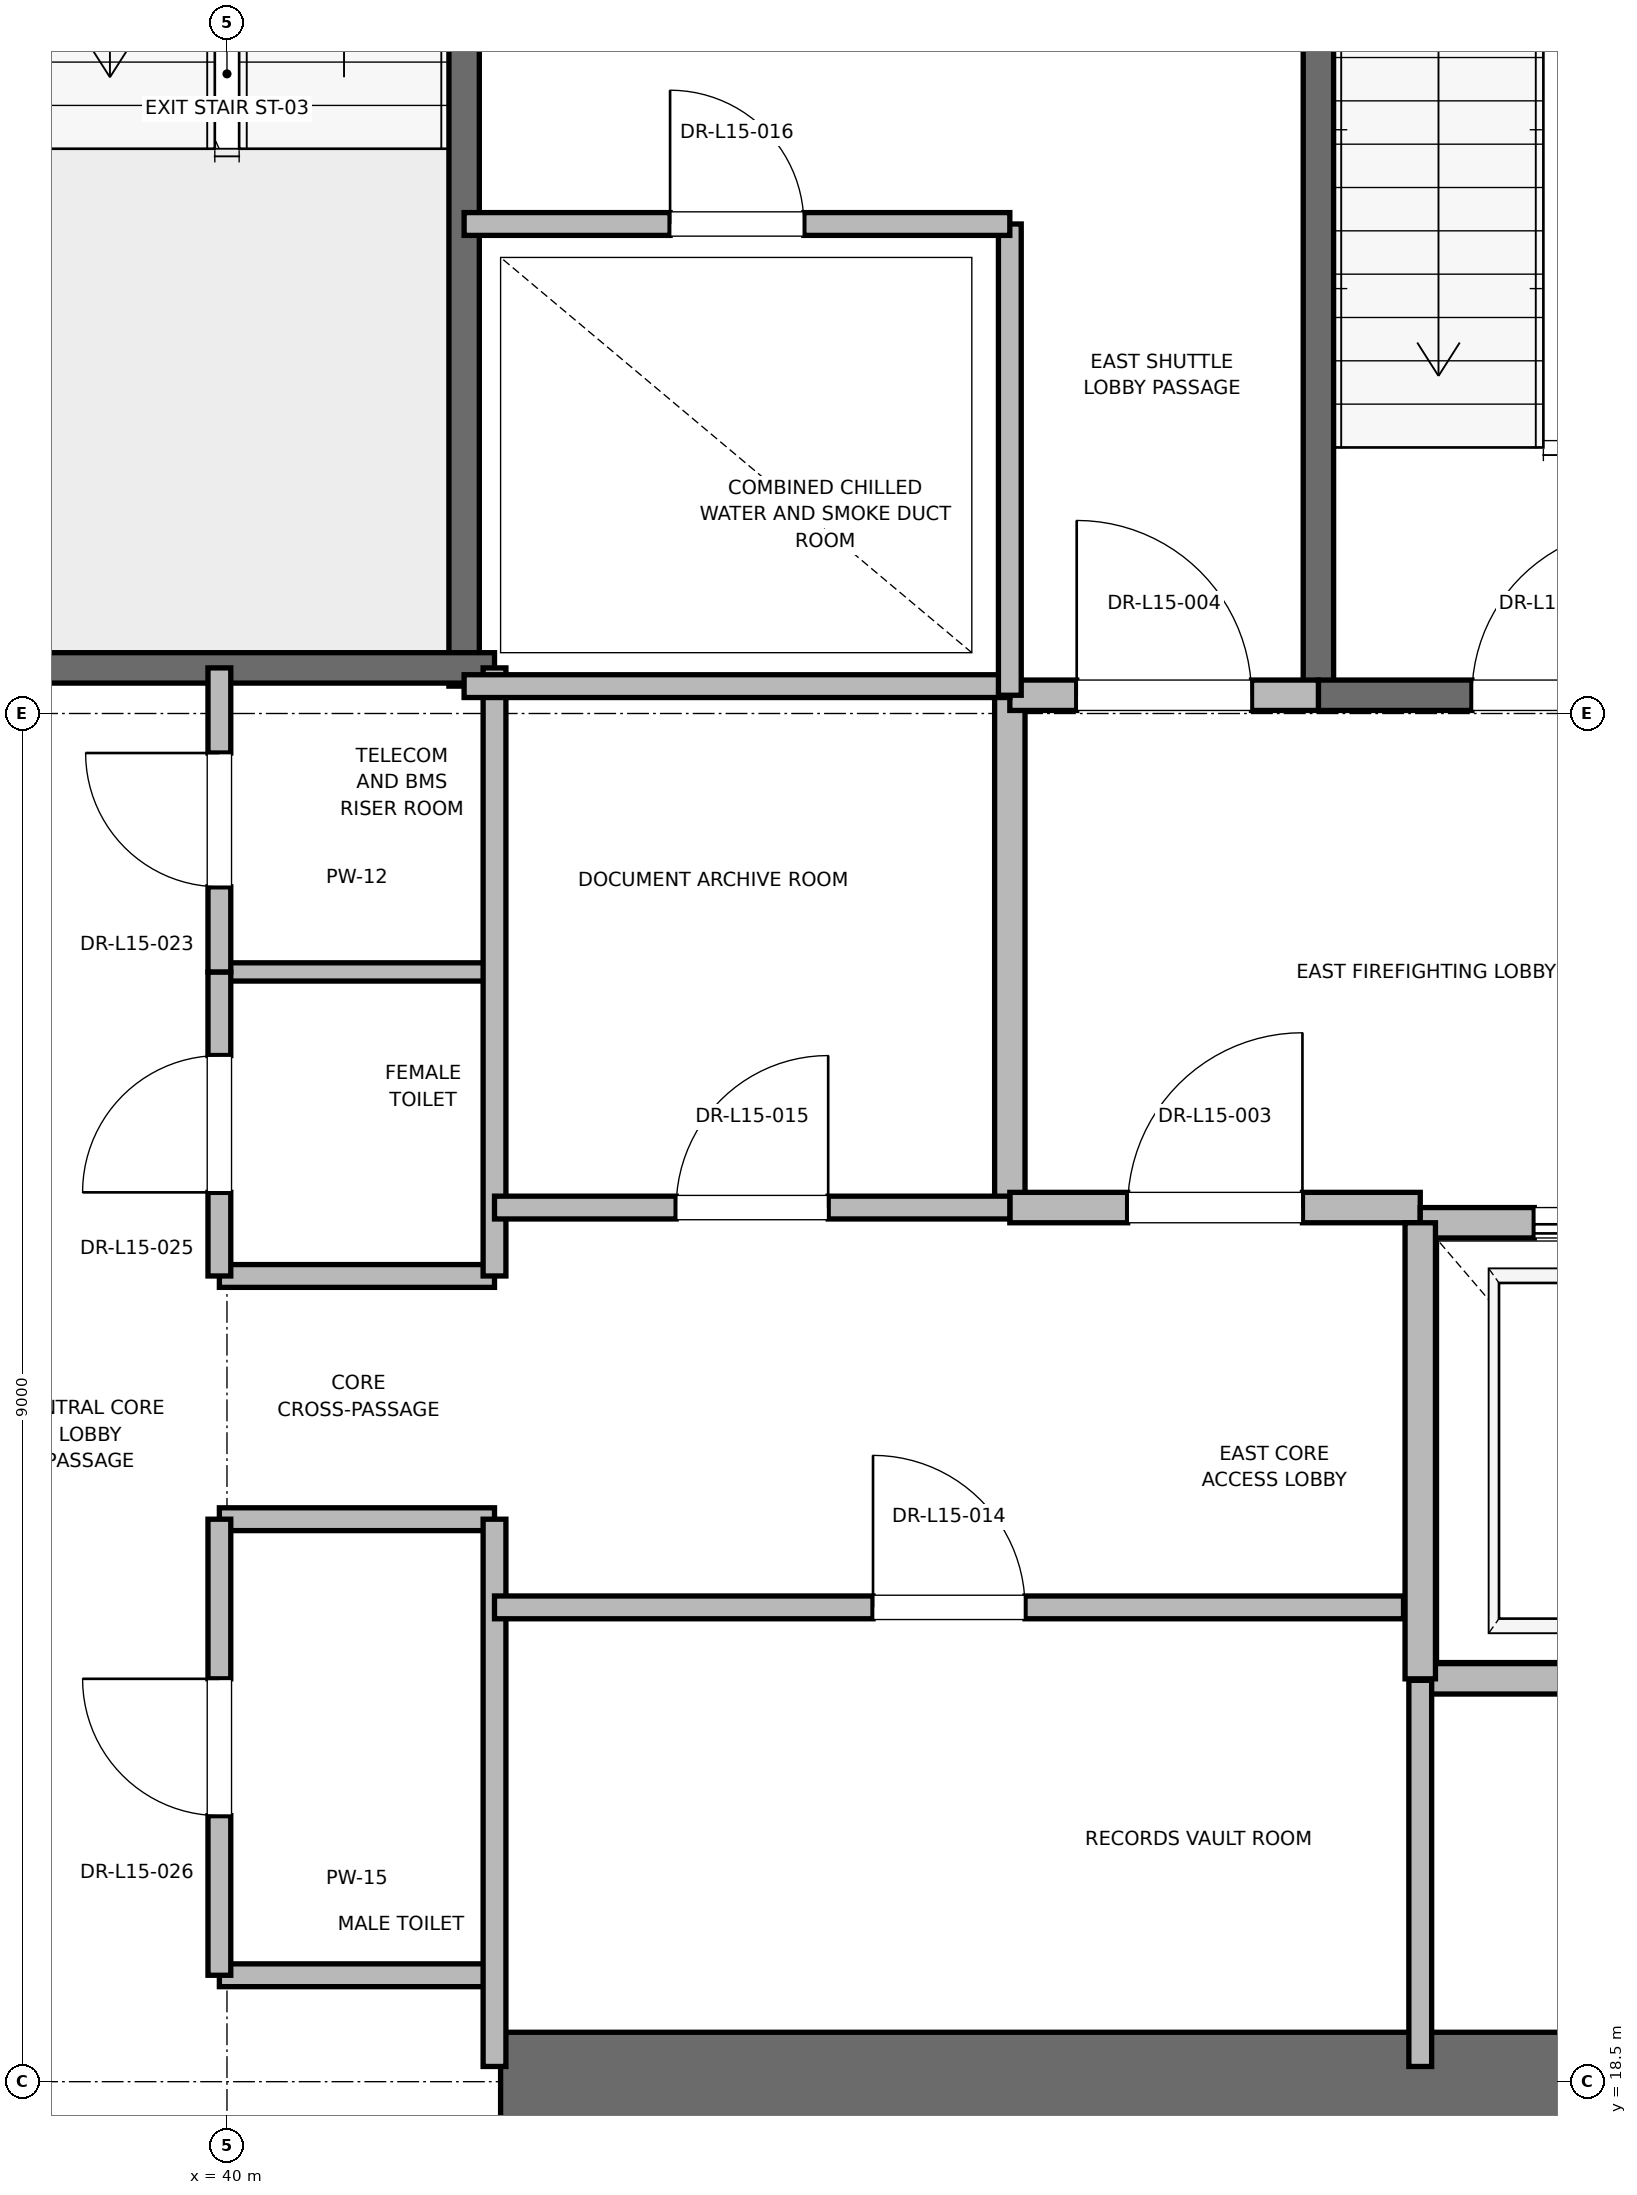
"""IFC4 building model, lengths in metres.
Left out: names, types, materials, properties, quantities, classifications, styles, units other than length and angle.
Written with IfcOpenShell. Run it as: python <this file> out.ifc"""

import sys

from ifc_helpers import new_model, si_unit, direction, frame, frame_2d, origin, place, context, subcontext, project, spatial, rectangle, extrude, element, fill, save


model = new_model("IFC4")
c1 = context("Model", 3, precision=1e-05, world=origin(), true_north=direction((0.0, 1.0)))
c2 = subcontext(c1, "Body", "Model", "MODEL_VIEW")
j1 = project(units=[si_unit("LENGTHUNIT", "METRE"), si_unit("PLANEANGLEUNIT", "RADIAN")], contexts=[c1])
p1 = place(None, origin())
s1 = spatial("IfcSite", under=j1, at=p1, CompositionType="ELEMENT")
p2 = place(p1, origin())
s2 = spatial("IfcBuilding", under=s1, at=p2, CompositionType="ELEMENT")
p3 = place(p2, frame((0.0, 0.0, 67.6)))
s3 = spatial("IfcBuildingStorey", under=s2, at=p3, CompositionType="ELEMENT", Elevation=67.6)
p4 = place(p3, frame((41.8, 18.5, 0.0), z_axis=(0.0, 0.0, 1.0), x_axis=(1.0, 0.0, 0.0)))
e1 = element("IfcWall", 1, at=p4, inside=s3, PredefinedType="SHEAR", context=c2, shape_type="SweptSolid", body=[
    extrude(rectangle(XDim=9.2, YDim=0.65, at=frame_2d((4.6, 0.0))), origin(), (0.0, 0.0, 1.0), 3.76),
])
p5 = place(p3, frame((47.18, 27.62, 0.0), z_axis=(0.0, 0.0, 1.0), x_axis=(0.0, 1.0, 0.0)))
e2 = element("IfcWall", 2, at=p5, inside=s3, PredefinedType="SOLIDWALL", context=c2, shape_type="SweptSolid", body=[
    extrude(rectangle(XDim=8.18, YDim=0.2, at=frame_2d((4.09, 0.0))), origin(), (0.0, 0.0, 1.0), 3.76),
])
p6 = place(p3, frame((47.18, 27.62, 0.0), z_axis=(0.0, 0.0, 1.0), x_axis=(1.0, 0.0, 0.0)))
e3 = element("IfcWall", 3, at=p6, inside=s3, PredefinedType="SOLIDWALL", context=c2, shape_type="SweptSolid", body=[
    extrude(rectangle(XDim=3.12, YDim=0.2, at=frame_2d((1.56, 0.0))), origin(), (0.0, 0.0, 1.0), 3.76),
])
p7 = place(p6, frame((1.01, 0.0, 0.0)))
e4 = element("IfcOpeningElement", 4, at=p7, cuts=e3, PredefinedType="OPENING", context=c2, shape_type="SweptSolid", body=[
    extrude(rectangle(XDim=1.1, YDim=2.15, at=frame_2d((0.55, 1.075))), frame((0.0, 0.1, 0.0), z_axis=(0.0, -1.0, 0.0), x_axis=(1.0, 0.0, 0.0)), (0.0, 0.0, 1.0), 0.2),
])
p8 = place(p3, frame((41.56, 27.68, 0.0), z_axis=(0.0, 0.0, 1.0), x_axis=(0.0, 1.0, 0.0)))
e5 = element("IfcWall", 5, at=p8, inside=s3, PredefinedType="SOLIDWALL", context=c2, shape_type="SweptSolid", body=[
    extrude(rectangle(XDim=8.57, YDim=0.2, at=frame_2d((4.285, 0.0))), origin(), (0.0, 0.0, 1.0), 3.76),
])
p9 = place(p3, frame((38.44, 27.8, 0.0), z_axis=(0.0, 0.0, 1.0), x_axis=(1.0, 0.0, 0.0)))
e6 = element("IfcWall", 6, at=p9, inside=s3, PredefinedType="SOLIDWALL", context=c2, shape_type="SweptSolid", body=[
    extrude(rectangle(XDim=3.32, YDim=0.2, at=frame_2d((1.66, 0.0))), origin(), (0.0, 0.0, 1.0), 3.76),
])
p10 = place(p3, frame((45.15, 24.25, 0.0), z_axis=(0.0, 0.0, 1.0), x_axis=(0.0, 1.0, 0.0)))
e7 = element("IfcWall", 7, at=p10, inside=s3, PredefinedType="PARTITIONING", context=c2, shape_type="SweptSolid", body=[
    extrude(rectangle(XDim=3.37, YDim=0.2, at=frame_2d((1.685, 0.0))), origin(), (0.0, 0.0, 1.0), 3.76),
])
p11 = place(p3, frame((45.15, 24.25, 0.0), z_axis=(0.0, 0.0, 1.0), x_axis=(1.0, 0.0, 0.0)))
e8 = element("IfcWall", 8, at=p11, inside=s3, PredefinedType="PARTITIONING", context=c2, shape_type="SweptSolid", body=[
    extrude(rectangle(XDim=2.7, YDim=0.2, at=frame_2d((1.35, 0.0))), origin(), (0.0, 0.0, 1.0), 3.76),
])
p12 = place(p11, frame((0.775, 0.0, 0.0)))
e9 = element("IfcOpeningElement", 9, at=p12, cuts=e8, PredefinedType="OPENING", context=c2, shape_type="SweptSolid", body=[
    extrude(rectangle(XDim=1.15, YDim=2.2, at=frame_2d((0.575, 1.1))), frame((0.0, 0.1, 0.0), z_axis=(0.0, -1.0, 0.0), x_axis=(1.0, 0.0, 0.0)), (0.0, 0.0, 1.0), 0.2),
])
p13 = place(p3, frame((45.15, 27.62, 0.0), z_axis=(0.0, 0.0, 1.0), x_axis=(1.0, 0.0, 0.0)))
e10 = element("IfcWall", 10, at=p13, inside=s3, PredefinedType="PARTITIONING", context=c2, shape_type="SweptSolid", body=[
    extrude(rectangle(XDim=2.03, YDim=0.2, at=frame_2d((1.015, 0.0))), origin(), (0.0, 0.0, 1.0), 3.76),
])
p14 = place(p13, frame((0.44, 0.0, 0.0)))
e11 = element("IfcOpeningElement", 11, at=p14, cuts=e10, PredefinedType="OPENING", context=c2, shape_type="SweptSolid", body=[
    extrude(rectangle(XDim=1.15, YDim=2.2, at=frame_2d((0.575, 1.1))), frame((0.0, 0.1, 0.0), z_axis=(0.0, -1.0, 0.0), x_axis=(1.0, 0.0, 0.0)), (0.0, 0.0, 1.0), 0.2),
])
p15 = place(p3, frame((47.85, 21.15, 0.0), z_axis=(0.0, 0.0, 1.0), x_axis=(1.0, 0.0, 0.0)))
e12 = element("IfcWall", 12, at=p15, inside=s3, PredefinedType="SOLIDWALL", context=c2, shape_type="SweptSolid", body=[
    extrude(rectangle(XDim=2.6, YDim=0.2, at=frame_2d((1.3, 0.0))), origin(), (0.0, 0.0, 1.0), 3.76),
])
p16 = place(p3, frame((50.45, 24.15, 0.0), z_axis=(0.0, 0.0, 1.0), x_axis=(-1.0, 0.0, 0.0)))
e13 = element("IfcWall", 13, at=p16, inside=s3, PredefinedType="SOLIDWALL", context=c2, shape_type="SweptSolid", body=[
    extrude(rectangle(XDim=2.6, YDim=0.2, at=frame_2d((1.3, 0.0))), origin(), (0.0, 0.0, 1.0), 2.54),
])
p17 = place(p16, frame((0.75, 0.0, 0.0)))
e14 = element("IfcOpeningElement", 14, at=p17, cuts=e13, PredefinedType="OPENING", context=c2, shape_type="SweptSolid", body=[
    extrude(rectangle(XDim=1.1, YDim=2.2, at=frame_2d((0.55, 1.1))), frame((0.0, 0.1, 0.0), z_axis=(0.0, -1.0, 0.0), x_axis=(1.0, 0.0, 0.0)), (0.0, 0.0, 1.0), 0.2),
])
p18 = place(p3, frame((47.85, 24.15, 0.0), z_axis=(0.0, 0.0, 1.0), x_axis=(0.0, -1.0, 0.0)))
e15 = element("IfcWall", 15, at=p18, inside=s3, PredefinedType="SOLIDWALL", context=c2, shape_type="SweptSolid", body=[
    extrude(rectangle(XDim=3.0, YDim=0.2, at=frame_2d((1.5, 0.0))), origin(), (0.0, 0.0, 1.0), 3.76),
])
for number, where, z_axis, x_axis in (
    (16, (39.95, 19.2, 0.0), (0.0, 0.0, 1.0), (1.0, 0.0, 0.0)),
    (17, (39.95, 22.2, 0.0), (0.0, 0.0, 1.0), (1.0, 0.0, 0.0)),
    (18, (39.95, 23.8, 0.0), (0.0, 0.0, 1.0), (1.0, 0.0, 0.0)),
):
    element("IfcWall", number, at=place(p3, frame(where, z_axis=z_axis, x_axis=x_axis)), inside=s3, PredefinedType="PARTITIONING", context=c2, shape_type="SweptSolid", body=[
        extrude(rectangle(XDim=1.81, YDim=0.15, at=frame_2d((0.905, 0.0))), origin(), (0.0, 0.0, 1.0), 2.85),
    ])
p19 = place(p3, frame((39.95, 25.8, 0.0), z_axis=(0.0, 0.0, 1.0), x_axis=(1.0, 0.0, 0.0)))
e19 = element("IfcWall", 19, at=p19, inside=s3, PredefinedType="PARTITIONING", context=c2, shape_type="SweptSolid", body=[
    extrude(rectangle(XDim=1.81, YDim=0.12, at=frame_2d((0.905, 0.0))), origin(), (0.0, 0.0, 1.0), 2.85),
])
p20 = place(p3, frame((41.76, 18.6, 0.0), z_axis=(0.0, 0.0, 1.0), x_axis=(0.0, 1.0, 0.0)))
e20 = element("IfcWall", 20, at=p20, inside=s3, PredefinedType="PARTITIONING", context=c2, shape_type="SweptSolid", body=[
    extrude(rectangle(XDim=3.6, YDim=0.15, at=frame_2d((1.8, 0.0))), origin(), (0.0, 0.0, 1.0), 2.54),
])
p21 = place(p3, frame((41.76, 23.8, 0.0), z_axis=(0.0, 0.0, 1.0), x_axis=(0.0, 1.0, 0.0)))
e21 = element("IfcWall", 21, at=p21, inside=s3, PredefinedType="PARTITIONING", context=c2, shape_type="SweptSolid", body=[
    extrude(rectangle(XDim=4.0, YDim=0.15, at=frame_2d((2.0, 0.0))), origin(), (0.0, 0.0, 1.0), 2.85),
])
p22 = place(p3, frame((39.95, 19.2, 0.0), z_axis=(0.0, 0.0, 1.0), x_axis=(0.0, 1.0, 0.0)))
e22 = element("IfcWall", 22, at=p22, inside=s3, PredefinedType="PARTITIONING", context=c2, shape_type="SweptSolid", body=[
    extrude(rectangle(XDim=3.0, YDim=0.15, at=frame_2d((1.5, 0.0))), origin(), (0.0, 0.0, 1.0), 2.85),
])
p23 = place(p22, frame((1.05, 0.0, 0.0)))
e23 = element("IfcOpeningElement", 23, at=p23, cuts=e22, PredefinedType="OPENING", context=c2, shape_type="SweptSolid", body=[
    extrude(rectangle(XDim=0.9, YDim=2.1, at=frame_2d((0.45, 1.05))), frame((0.0, 0.075, 0.0), z_axis=(0.0, -1.0, 0.0), x_axis=(1.0, 0.0, 0.0)), (0.0, 0.0, 1.0), 0.15),
])
p24 = place(p3, frame((39.95, 23.8, 0.0), z_axis=(0.0, 0.0, 1.0), x_axis=(0.0, 1.0, 0.0)))
e24 = element("IfcWall", 24, at=p24, inside=s3, PredefinedType="PARTITIONING", context=c2, shape_type="SweptSolid", body=[
    extrude(rectangle(XDim=2.0, YDim=0.15, at=frame_2d((1.0, 0.0))), origin(), (0.0, 0.0, 1.0), 2.85),
])
p25 = place(p24, frame((0.55, 0.0, 0.0)))
e25 = element("IfcOpeningElement", 25, at=p25, cuts=e24, PredefinedType="OPENING", context=c2, shape_type="SweptSolid", body=[
    extrude(rectangle(XDim=0.9, YDim=2.1, at=frame_2d((0.45, 1.05))), frame((0.0, 0.075, 0.0), z_axis=(0.0, -1.0, 0.0), x_axis=(1.0, 0.0, 0.0)), (0.0, 0.0, 1.0), 0.15),
])
p26 = place(p3, frame((39.95, 25.8, 0.0), z_axis=(0.0, 0.0, 1.0), x_axis=(0.0, 1.0, 0.0)))
e26 = element("IfcWall", 26, at=p26, inside=s3, PredefinedType="PARTITIONING", context=c2, shape_type="SweptSolid", body=[
    extrude(rectangle(XDim=2.0, YDim=0.15, at=frame_2d((1.0, 0.0))), origin(), (0.0, 0.0, 1.0), 2.85),
])
p27 = place(p26, frame((0.56, 0.0, 0.0)))
e27 = element("IfcOpeningElement", 27, at=p27, cuts=e26, PredefinedType="OPENING", context=c2, shape_type="SweptSolid", body=[
    extrude(rectangle(XDim=0.88, YDim=2.1, at=frame_2d((0.44, 1.05))), frame((0.0, 0.075, 0.0), z_axis=(0.0, -1.0, 0.0), x_axis=(1.0, 0.0, 0.0)), (0.0, 0.0, 1.0), 0.15),
])
p28 = place(p3, frame((41.56, 27.68, 0.0), z_axis=(0.0, 0.0, 1.0), x_axis=(1.0, 0.0, 0.0)))
e28 = element("IfcWall", 28, at=p28, inside=s3, PredefinedType="PARTITIONING", context=c2, shape_type="SweptSolid", body=[
    extrude(rectangle(XDim=3.59, YDim=0.15, at=frame_2d((1.795, 0.0))), origin(), (0.0, 0.0, 1.0), 2.85),
])
p29 = place(p3, frame((47.85, 18.6, 0.0), z_axis=(0.0, 0.0, 1.0), x_axis=(0.0, 1.0, 0.0)))
e29 = element("IfcWall", 29, at=p29, inside=s3, PredefinedType="PARTITIONING", context=c2, shape_type="SweptSolid", body=[
    extrude(rectangle(XDim=2.54, YDim=0.15, at=frame_2d((1.27, 0.0))), origin(), (0.0, 0.0, 1.0), 2.85),
])
p30 = place(p3, frame((41.76, 21.62, 0.0), z_axis=(0.0, 0.0, 1.0), x_axis=(1.0, 0.0, 0.0)))
e30 = element("IfcWall", 30, at=p30, inside=s3, PredefinedType="PARTITIONING", context=c2, shape_type="SweptSolid", body=[
    extrude(rectangle(XDim=5.98, YDim=0.15, at=frame_2d((2.99, 0.0))), origin(), (0.0, 0.0, 1.0), 2.85),
])
p31 = place(p30, frame((2.49, 0.0, 0.0)))
e31 = element("IfcOpeningElement", 31, at=p31, cuts=e30, PredefinedType="OPENING", context=c2, shape_type="SweptSolid", body=[
    extrude(rectangle(XDim=1.0, YDim=2.15, at=frame_2d((0.5, 1.075))), frame((0.0, 0.075, 0.0), z_axis=(0.0, -1.0, 0.0), x_axis=(1.0, 0.0, 0.0)), (0.0, 0.0, 1.0), 0.15),
])
p32 = place(p3, frame((41.76, 24.25, 0.0), z_axis=(0.0, 0.0, 1.0), x_axis=(1.0, 0.0, 0.0)))
e32 = element("IfcWall", 32, at=p32, inside=s3, PredefinedType="PARTITIONING", context=c2, shape_type="SweptSolid", body=[
    extrude(rectangle(XDim=3.39, YDim=0.15, at=frame_2d((1.695, 0.0))), origin(), (0.0, 0.0, 1.0), 2.85),
])
p33 = place(p32, frame((1.195, 0.0, 0.0)))
e33 = element("IfcOpeningElement", 33, at=p33, cuts=e32, PredefinedType="OPENING", context=c2, shape_type="SweptSolid", body=[
    extrude(rectangle(XDim=1.0, YDim=2.15, at=frame_2d((0.5, 1.075))), frame((0.0, 0.075, 0.0), z_axis=(0.0, -1.0, 0.0), x_axis=(1.0, 0.0, 0.0)), (0.0, 0.0, 1.0), 0.15),
])
p34 = place(p3, frame((45.15, 27.62, 0.0), z_axis=(0.0, 0.0, 1.0), x_axis=(0.0, 1.0, 0.0)))
e34 = element("IfcWall", 34, at=p34, inside=s3, PredefinedType="PARTITIONING", context=c2, shape_type="SweptSolid", body=[
    extrude(rectangle(XDim=3.1, YDim=0.15, at=frame_2d((1.55, 0.0))), origin(), (0.0, 0.0, 1.0), 2.85),
])
p35 = place(p3, frame((41.56, 30.72, 0.0), z_axis=(0.0, 0.0, 1.0), x_axis=(1.0, 0.0, 0.0)))
e35 = element("IfcWall", 35, at=p35, inside=s3, PredefinedType="PARTITIONING", context=c2, shape_type="SweptSolid", body=[
    extrude(rectangle(XDim=3.59, YDim=0.15, at=frame_2d((1.795, 0.0))), origin(), (0.0, 0.0, 1.0), 2.85),
])
p36 = place(p35, frame((1.355, 0.0, 0.0)))
e36 = element("IfcOpeningElement", 36, at=p36, cuts=e35, PredefinedType="OPENING", context=c2, shape_type="SweptSolid", body=[
    extrude(rectangle(XDim=0.88, YDim=2.1, at=frame_2d((0.44, 1.05))), frame((0.0, 0.075, 0.0), z_axis=(0.0, -1.0, 0.0), x_axis=(1.0, 0.0, 0.0)), (0.0, 0.0, 1.0), 0.15),
])
p37 = place(p7, origin())
e37 = element("IfcDoor", 37, at=p37, inside=s3, OperationType="SINGLE_SWING_RIGHT", PredefinedType="DOOR", context=c2, shape_type="SweptSolid", body=[
    extrude(rectangle(XDim=1.1, YDim=2.15, at=frame_2d((0.55, 1.075))), frame((0.0, 0.025, 0.0), z_axis=(0.0, -1.0, 0.0), x_axis=(1.0, 0.0, 0.0)), (0.0, 0.0, 1.0), 0.05),
])
fill(e4, e37)
p38 = place(p12, origin())
e38 = element("IfcDoor", 38, at=p38, inside=s3, OperationType="SINGLE_SWING_RIGHT", PredefinedType="DOOR", context=c2, shape_type="SweptSolid", body=[
    extrude(rectangle(XDim=1.15, YDim=2.2, at=frame_2d((0.575, 1.1))), frame((0.0, 0.025, 0.0), z_axis=(0.0, -1.0, 0.0), x_axis=(1.0, 0.0, 0.0)), (0.0, 0.0, 1.0), 0.05),
])
fill(e9, e38)
p39 = place(p14, origin())
e39 = element("IfcDoor", 39, at=p39, inside=s3, OperationType="SINGLE_SWING_LEFT", PredefinedType="DOOR", context=c2, shape_type="SweptSolid", body=[
    extrude(rectangle(XDim=1.15, YDim=2.2, at=frame_2d((0.575, 1.1))), frame((0.0, 0.025, 0.0), z_axis=(0.0, -1.0, 0.0), x_axis=(1.0, 0.0, 0.0)), (0.0, 0.0, 1.0), 0.05),
])
fill(e11, e39)
p40 = place(p17, origin())
e40 = element("IfcDoor", 40, at=p40, inside=s3, OperationType="SLIDING_TO_RIGHT", PredefinedType="DOOR", context=c2, shape_type="SweptSolid", body=[
    extrude(rectangle(XDim=1.1, YDim=2.2, at=frame_2d((0.55, 1.1))), frame((0.0, 0.025, 0.0), z_axis=(0.0, -1.0, 0.0), x_axis=(1.0, 0.0, 0.0)), (0.0, 0.0, 1.0), 0.05),
])
fill(e14, e40)
p41 = place(p23, origin())
e41 = element("IfcDoor", 41, at=p41, inside=s3, OperationType="SINGLE_SWING_RIGHT", PredefinedType="DOOR", context=c2, shape_type="SweptSolid", body=[
    extrude(rectangle(XDim=0.9, YDim=2.1, at=frame_2d((0.45, 1.05))), frame((0.0, 0.025, 0.0), z_axis=(0.0, -1.0, 0.0), x_axis=(1.0, 0.0, 0.0)), (0.0, 0.0, 1.0), 0.05),
])
fill(e23, e41)
p42 = place(p25, origin())
e42 = element("IfcDoor", 42, at=p42, inside=s3, OperationType="SINGLE_SWING_LEFT", PredefinedType="DOOR", context=c2, shape_type="SweptSolid", body=[
    extrude(rectangle(XDim=0.9, YDim=2.1, at=frame_2d((0.45, 1.05))), frame((0.0, 0.025, 0.0), z_axis=(0.0, -1.0, 0.0), x_axis=(1.0, 0.0, 0.0)), (0.0, 0.0, 1.0), 0.05),
])
fill(e25, e42)
p43 = place(p27, origin())
e43 = element("IfcDoor", 43, at=p43, inside=s3, OperationType="SINGLE_SWING_RIGHT", PredefinedType="DOOR", context=c2, shape_type="SweptSolid", body=[
    extrude(rectangle(XDim=0.88, YDim=2.1, at=frame_2d((0.44, 1.05))), frame((0.0, 0.025, 0.0), z_axis=(0.0, -1.0, 0.0), x_axis=(1.0, 0.0, 0.0)), (0.0, 0.0, 1.0), 0.05),
])
fill(e27, e43)
p44 = place(p31, origin())
e44 = element("IfcDoor", 44, at=p44, inside=s3, OperationType="SINGLE_SWING_LEFT", PredefinedType="DOOR", context=c2, shape_type="SweptSolid", body=[
    extrude(rectangle(XDim=1.0, YDim=2.15, at=frame_2d((0.5, 1.075))), frame((0.0, 0.025, 0.0), z_axis=(0.0, -1.0, 0.0), x_axis=(1.0, 0.0, 0.0)), (0.0, 0.0, 1.0), 0.05),
])
fill(e31, e44)
p45 = place(p33, origin())
e45 = element("IfcDoor", 45, at=p45, inside=s3, OperationType="SINGLE_SWING_RIGHT", PredefinedType="DOOR", context=c2, shape_type="SweptSolid", body=[
    extrude(rectangle(XDim=1.0, YDim=2.15, at=frame_2d((0.5, 1.075))), frame((0.0, 0.025, 0.0), z_axis=(0.0, -1.0, 0.0), x_axis=(1.0, 0.0, 0.0)), (0.0, 0.0, 1.0), 0.05),
])
fill(e33, e45)
p46 = place(p36, origin())
e46 = element("IfcDoor", 46, at=p46, inside=s3, OperationType="SINGLE_SWING_LEFT", PredefinedType="DOOR", context=c2, shape_type="SweptSolid", body=[
    extrude(rectangle(XDim=0.88, YDim=2.1, at=frame_2d((0.44, 1.05))), frame((0.0, 0.025, 0.0), z_axis=(0.0, -1.0, 0.0), x_axis=(1.0, 0.0, 0.0)), (0.0, 0.0, 1.0), 0.05),
])
fill(e36, e46)
save(model, sys.argv[1])
